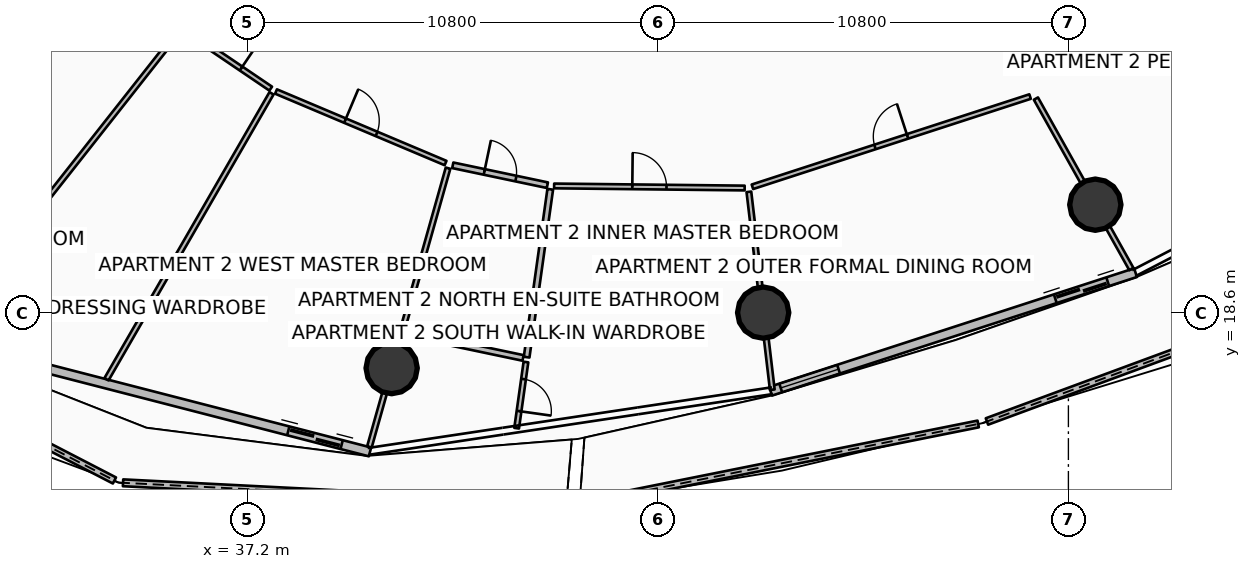
"""IFC4 building model, lengths in metres.
Left out: names, types, materials, properties, quantities, classifications, styles, units other than length and angle.
Written with IfcOpenShell. Run it as: python <this file> out.ifc"""

import sys

from ifc_helpers import new_model, si_unit, direction, frame, frame_2d, origin, origin_2d, place, context, subcontext, project, spatial, polyline, rectangle, circle, outline, extrude, element, fill, save


model = new_model("IFC4")
c1 = context("Model", 3, precision=1e-05, world=origin(), true_north=direction((0.0, 1.0)))
c2 = subcontext(c1, "Body", "Model", "MODEL_VIEW")
j1 = project(units=[si_unit("LENGTHUNIT", "METRE"), si_unit("PLANEANGLEUNIT", "RADIAN")], contexts=[c1])
p1 = place(None, origin())
s1 = spatial("IfcSite", under=j1, at=p1, CompositionType="ELEMENT")
p2 = place(p1, origin())
s2 = spatial("IfcBuilding", under=s1, at=p2, CompositionType="ELEMENT")
p3 = place(p2, frame((0.0, 0.0, 37.65)))
s3 = spatial("IfcBuildingStorey", under=s2, at=p3, CompositionType="ELEMENT", Elevation=37.65)
for number, where, z_axis, x_axis in (
    (1, (40.992, 17.151, 0.0), (0.0, 0.0, 1.0), (1.0, 0.0, 0.0)),
    (2, (50.768, 18.611, 0.0), (0.0, 0.0, 1.0), (1.0, 0.0, 0.0)),
    (3, (59.508, 21.45, 0.0), (0.0, 0.0, 1.0), (1.0, 0.0, 0.0)),
):
    element("IfcColumn", number, at=place(p3, frame(where, z_axis=z_axis, x_axis=x_axis)), inside=s3, PredefinedType="COLUMN", context=c2, shape_type="SweptSolid", body=[
        extrude(circle(Radius=0.675, at=origin_2d()), origin(), (0.0, 0.0, 1.0), 3.5),
    ])
p4 = place(p3, frame((22.527, 19.973, 0.0), z_axis=(0.0, 0.0, 1.0), x_axis=(0.888165194013, -0.459524306368, 0.0)))
e4 = element("IfcWall", 4, at=p4, inside=s3, PredefinedType="PARAPET", context=c2, shape_type="SweptSolid", body=[
    extrude(outline(polyline([(0.0, 0.0), (12.577, 0.0), (12.577, 1.148), (6.289, 1.284), (0.0, 1.483), (0.0, 0.0)])), frame((0.0, 0.09, 0.0), z_axis=(0.0, -1.0, 0.0), x_axis=(1.0, 0.0, 0.0)), (0.0, 0.0, 1.0), 0.18),
])
p5 = place(p3, frame((33.924, 14.133, 0.0), z_axis=(0.0, 0.0, 1.0), x_axis=(0.998712715241, -0.050723884084, 0.0)))
e5 = element("IfcWall", 5, at=p5, inside=s3, PredefinedType="PARAPET", context=c2, shape_type="SweptSolid", body=[
    extrude(outline(polyline([(0.0, 0.0), (11.677, 0.0), (11.677, 1.224), (5.838, 1.127), (0.0, 1.148), (0.0, 0.0)])), frame((0.0, 0.09, 0.0), z_axis=(0.0, -1.0, 0.0), x_axis=(1.0, 0.0, 0.0)), (0.0, 0.0, 1.0), 0.18),
])
p6 = place(p3, frame((45.938, 13.58, 0.0), z_axis=(0.0, 0.0, 1.0), x_axis=(0.980527969077, 0.19637948431, 0.0)))
e6 = element("IfcWall", 6, at=p6, inside=s3, PredefinedType="PARAPET", context=c2, shape_type="SweptSolid", body=[
    extrude(outline(polyline([(0.0, 0.0), (10.697, 0.0), (10.697, 1.632), (5.348, 1.418), (0.0, 1.233), (0.0, 0.0)])), frame((0.0, 0.09, 0.0), z_axis=(0.0, -1.0, 0.0), x_axis=(1.0, 0.0, 0.0)), (0.0, 0.0, 1.0), 0.18),
])
p7 = place(p3, frame((56.656, 15.746, 0.0), z_axis=(0.0, 0.0, 1.0), x_axis=(0.938003942123, 0.346624587358, 0.0)))
e7 = element("IfcWall", 7, at=p7, inside=s3, PredefinedType="PARAPET", context=c2, shape_type="SweptSolid", body=[
    extrude(outline(polyline([(0.0, 0.0), (10.964, 0.0), (10.964, 1.86), (5.482, 1.798), (0.0, 1.632), (0.0, 0.0)])), frame((0.0, 0.09, 0.0), z_axis=(0.0, -1.0, 0.0), x_axis=(1.0, 0.0, 0.0)), (0.0, 0.0, 1.0), 0.18),
])
p8 = place(p3, frame((28.946, 17.904, 0.0), z_axis=(0.0, 0.0, 1.0), x_axis=(0.96833871487, -0.249640007378, 0.0)))
e8 = element("IfcWall", 8, at=p8, inside=s3, PredefinedType="SOLIDWALL", context=c2, shape_type="SweptSolid", body=[
    extrude(rectangle(XDim=11.851, YDim=0.24, at=frame_2d((5.926, 0.0))), origin(), (0.0, 0.0, 1.0), 2.45),
])
p9 = place(p8, frame((9.631, 0.0, 0.0)))
e9 = element("IfcOpeningElement", 9, at=p9, cuts=e8, PredefinedType="OPENING", context=c2, shape_type="SweptSolid", body=[
    extrude(rectangle(XDim=1.45, YDim=2.15, at=frame_2d((0.725, 1.075))), frame((0.0, 0.13, 0.0), z_axis=(0.0, -1.0, 0.0), x_axis=(1.0, 0.0, 0.0)), (0.0, 0.0, 1.0), 0.26),
])
p10 = place(p8, frame((0.28, 0.0, 0.65)))
e10 = element("IfcOpeningElement", 10, at=p10, cuts=e8, PredefinedType="OPENING", context=c2, shape_type="SweptSolid", body=[
    extrude(rectangle(XDim=1.6, YDim=1.5, at=frame_2d((0.8, 0.75))), frame((0.0, 0.13, 0.0), z_axis=(0.0, -1.0, 0.0), x_axis=(1.0, 0.0, 0.0)), (0.0, 0.0, 1.0), 0.26),
])
p11 = place(p3, frame((50.964, 16.542, 0.0), z_axis=(0.0, 0.0, 1.0), x_axis=(0.951054679225, 0.309022648238, 0.0)))
e11 = element("IfcWall", 11, at=p11, inside=s3, PredefinedType="SOLIDWALL", context=c2, shape_type="SweptSolid", body=[
    extrude(rectangle(XDim=10.097, YDim=0.24, at=frame_2d((5.048, 0.0))), origin(), (0.0, 0.0, 1.0), 2.45),
])
p12 = place(p11, frame((7.877, 0.0, 0.0)))
e12 = element("IfcOpeningElement", 12, at=p12, cuts=e11, PredefinedType="OPENING", context=c2, shape_type="SweptSolid", body=[
    extrude(rectangle(XDim=1.45, YDim=2.15, at=frame_2d((0.725, 1.075))), frame((0.0, 0.13, 0.0), z_axis=(0.0, -1.0, 0.0), x_axis=(1.0, 0.0, 0.0)), (0.0, 0.0, 1.0), 0.26),
])
p13 = place(p11, frame((0.28, 0.0, 0.65)))
e13 = element("IfcOpeningElement", 13, at=p13, cuts=e11, PredefinedType="OPENING", context=c2, shape_type="SweptSolid", body=[
    extrude(rectangle(XDim=1.6, YDim=1.5, at=frame_2d((0.8, 0.75))), frame((0.0, 0.13, 0.0), z_axis=(0.0, -1.0, 0.0), x_axis=(1.0, 0.0, 0.0)), (0.0, 0.0, 1.0), 0.26),
])
p14 = place(p3, frame((33.291, 27.947, 0.0), z_axis=(0.0, 0.0, 1.0), x_axis=(-0.72304195697, -0.690804117287, 0.0)))
e14 = element("IfcWall", 14, at=p14, inside=s3, PredefinedType="PARTITIONING", context=c2, shape_type="SweptSolid", body=[
    extrude(rectangle(XDim=10.36, YDim=0.125, at=frame_2d((5.18, 0.0))), origin(), (0.0, 0.0, 1.0), 2.94),
])
p15 = place(p3, frame((35.4, 26.017, 0.0), z_axis=(0.0, 0.0, 1.0), x_axis=(-0.619085809847, -0.785323347447, 0.0)))
e15 = element("IfcWall", 15, at=p15, inside=s3, PredefinedType="PARTITIONING", context=c2, shape_type="SweptSolid", body=[
    extrude(rectangle(XDim=10.322, YDim=0.125, at=frame_2d((5.161, 0.0))), origin(), (0.0, 0.0, 1.0), 2.867),
])
p16 = place(p3, frame((37.831, 24.381, 0.0), z_axis=(0.0, 0.0, 1.0), x_axis=(-0.499878153527, -0.866095740451, 0.0)))
e16 = element("IfcWall", 16, at=p16, inside=s3, PredefinedType="PARTITIONING", context=c2, shape_type="SweptSolid", body=[
    extrude(rectangle(XDim=8.687, YDim=0.125, at=frame_2d((4.344, 0.0))), origin(), (0.0, 0.0, 1.0), 2.94),
])
p17 = place(p3, frame((35.544, 26.039, 0.0), z_axis=(0.0, 0.0, 1.0), x_axis=(0.827867904516, -0.560923107629, 0.0)))
e17 = element("IfcWall", 17, at=p17, inside=s3, PredefinedType="PARTITIONING", context=c2, shape_type="SweptSolid", body=[
    extrude(rectangle(XDim=2.736, YDim=0.125, at=frame_2d((1.368, 0.0))), origin(), (0.0, 0.0, 1.0), 2.867),
])
p18 = place(p17, frame((0.943, 0.0, 0.0)))
e18 = element("IfcOpeningElement", 18, at=p18, cuts=e17, PredefinedType="OPENING", context=c2, shape_type="SweptSolid", body=[
    extrude(rectangle(XDim=0.85, YDim=2.06, at=frame_2d((0.425, 1.03))), frame((0.0, 0.073, 0.0), z_axis=(0.0, -1.0, 0.0), x_axis=(1.0, 0.0, 0.0)), (0.0, 0.0, 1.0), 0.145),
])
p19 = place(p3, frame((37.949, 24.428, 0.0), z_axis=(0.0, 0.0, 1.0), x_axis=(0.921391247889, -0.388636293098, 0.0)))
e19 = element("IfcWall", 19, at=p19, inside=s3, PredefinedType="PARTITIONING", context=c2, shape_type="SweptSolid", body=[
    extrude(rectangle(XDim=4.842, YDim=0.125, at=frame_2d((2.421, 0.0))), origin(), (0.0, 0.0, 1.0), 2.867),
])
p20 = place(p19, frame((1.971, 0.0, 0.0)))
e20 = element("IfcOpeningElement", 20, at=p20, cuts=e19, PredefinedType="OPENING", context=c2, shape_type="SweptSolid", body=[
    extrude(rectangle(XDim=0.9, YDim=2.08, at=frame_2d((0.45, 1.04))), frame((0.0, 0.073, 0.0), z_axis=(0.0, -1.0, 0.0), x_axis=(1.0, 0.0, 0.0)), (0.0, 0.0, 1.0), 0.145),
])
p21 = place(p3, frame((42.475, 22.411, 0.0), z_axis=(0.0, 0.0, 1.0), x_axis=(-0.271439615814, -0.96245547168, 0.0)))
e21 = element("IfcWall", 21, at=p21, inside=s3, PredefinedType="PARTITIONING", context=c2, shape_type="SweptSolid", body=[
    extrude(rectangle(XDim=7.619, YDim=0.125, at=frame_2d((3.81, 0.0))), origin(), (0.0, 0.0, 1.0), 2.867),
])
p22 = place(p3, frame((42.6, 22.487, 0.0), z_axis=(0.0, 0.0, 1.0), x_axis=(0.978579306251, -0.20587020517, 0.0)))
e22 = element("IfcWall", 22, at=p22, inside=s3, PredefinedType="PARTITIONING", context=c2, shape_type="SweptSolid", body=[
    extrude(rectangle(XDim=2.544, YDim=0.15, at=frame_2d((1.272, 0.0))), origin(), (0.0, 0.0, 1.0), 2.867),
])
p23 = place(p22, frame((0.847, 0.0, 0.0)))
e23 = element("IfcOpeningElement", 23, at=p23, cuts=e22, PredefinedType="OPENING", context=c2, shape_type="SweptSolid", body=[
    extrude(rectangle(XDim=0.85, YDim=2.06, at=frame_2d((0.425, 1.03))), frame((0.0, 0.085, 0.0), z_axis=(0.0, -1.0, 0.0), x_axis=(1.0, 0.0, 0.0)), (0.0, 0.0, 1.0), 0.17),
])
p24 = place(p3, frame((41.354, 18.069, 0.0), z_axis=(0.0, 0.0, 1.0), x_axis=(0.978588253421, -0.205827671283, 0.0)))
e24 = element("IfcWall", 24, at=p24, inside=s3, PredefinedType="PARTITIONING", context=c2, shape_type="SweptSolid", body=[
    extrude(rectangle(XDim=3.163, YDim=0.15, at=frame_2d((1.582, 0.0))), origin(), (0.0, 0.0, 1.0), 2.867),
])
p25 = place(p3, frame((45.165, 21.855, 0.0), z_axis=(0.0, 0.0, 1.0), x_axis=(-0.139367219172, -0.990240767804, 0.0)))
e25 = element("IfcWall", 25, at=p25, inside=s3, PredefinedType="PARTITIONING", context=c2, shape_type="SweptSolid", body=[
    extrude(rectangle(XDim=4.46, YDim=0.15, at=frame_2d((2.23, 0.0))), origin(), (0.0, 0.0, 1.0), 2.94),
])
p26 = place(p3, frame((44.526, 17.31, 0.0), z_axis=(0.0, 0.0, 1.0), x_axis=(-0.139282491489, -0.990252688744, 0.0)))
e26 = element("IfcWall", 26, at=p26, inside=s3, PredefinedType="PARTITIONING", context=c2, shape_type="SweptSolid", body=[
    extrude(rectangle(XDim=1.758, YDim=0.125, at=frame_2d((0.879, 0.0))), origin(), (0.0, 0.0, 1.0), 2.94),
])
p27 = place(p26, frame((0.454, 0.0, 0.0)))
e27 = element("IfcOpeningElement", 27, at=p27, cuts=e26, PredefinedType="OPENING", context=c2, shape_type="SweptSolid", body=[
    extrude(rectangle(XDim=0.85, YDim=2.06, at=frame_2d((0.425, 1.03))), frame((0.0, 0.073, 0.0), z_axis=(0.0, -1.0, 0.0), x_axis=(1.0, 0.0, 0.0)), (0.0, 0.0, 1.0), 0.145),
])
p28 = place(p3, frame((45.268, 21.944, 0.0), z_axis=(0.0, 0.0, 1.0), x_axis=(0.999939426187, -0.011006541512, 0.0)))
e28 = element("IfcWall", 28, at=p28, inside=s3, PredefinedType="PARTITIONING", context=c2, shape_type="SweptSolid", body=[
    extrude(rectangle(XDim=5.013, YDim=0.125, at=frame_2d((2.506, 0.0))), origin(), (0.0, 0.0, 1.0), 2.94),
])
p29 = place(p28, frame((2.056, 0.0, 0.0)))
e29 = element("IfcOpeningElement", 29, at=p29, cuts=e28, PredefinedType="OPENING", context=c2, shape_type="SweptSolid", body=[
    extrude(rectangle(XDim=0.9, YDim=2.08, at=frame_2d((0.45, 1.04))), frame((0.0, 0.073, 0.0), z_axis=(0.0, -1.0, 0.0), x_axis=(1.0, 0.0, 0.0)), (0.0, 0.0, 1.0), 0.145),
])
p30 = place(p3, frame((50.392, 21.788, 0.0), z_axis=(0.0, 0.0, 1.0), x_axis=(0.11749238711, -0.993073783246, 0.0)))
e30 = element("IfcWall", 30, at=p30, inside=s3, PredefinedType="PARTITIONING", context=c2, shape_type="SweptSolid", body=[
    extrude(rectangle(XDim=5.243, YDim=0.125, at=frame_2d((2.621, 0.0))), origin(), (0.0, 0.0, 1.0), 2.867),
])
p31 = place(p3, frame((57.945, 24.242, 0.0), z_axis=(0.0, 0.0, 1.0), x_axis=(0.488630834306, -0.872490634772, 0.0)))
e31 = element("IfcWall", 31, at=p31, inside=s3, PredefinedType="PARTITIONING", context=c2, shape_type="SweptSolid", body=[
    extrude(rectangle(XDim=5.143, YDim=0.125, at=frame_2d((2.571, 0.0))), origin(), (0.0, 0.0, 1.0), 2.867),
])
p32 = place(p3, frame((50.485, 21.921, 0.0), z_axis=(0.0, 0.0, 1.0), x_axis=(0.951055318468, 0.309020680883, 0.0)))
e32 = element("IfcWall", 32, at=p32, inside=s3, PredefinedType="PARTITIONING", context=c2, shape_type="SweptSolid", body=[
    extrude(rectangle(XDim=7.682, YDim=0.125, at=frame_2d((3.841, 0.0))), origin(), (0.0, 0.0, 1.0), 2.867),
])
p33 = place(p32, frame((3.391, 0.0, 0.0)))
e33 = element("IfcOpeningElement", 33, at=p33, cuts=e32, PredefinedType="OPENING", context=c2, shape_type="SweptSolid", body=[
    extrude(rectangle(XDim=0.9, YDim=2.08, at=frame_2d((0.45, 1.04))), frame((0.0, 0.073, 0.0), z_axis=(0.0, -1.0, 0.0), x_axis=(1.0, 0.0, 0.0)), (0.0, 0.0, 1.0), 0.145),
])
p34 = place(p9, origin())
e34 = element("IfcDoor", 34, at=p34, inside=s3, OperationType="DOUBLE_DOOR_SLIDING", PredefinedType="DOOR", context=c2, shape_type="SweptSolid", body=[
    extrude(rectangle(XDim=1.45, YDim=2.15, at=frame_2d((0.725, 1.075))), frame((0.0, 0.025, 0.0), z_axis=(0.0, -1.0, 0.0), x_axis=(1.0, 0.0, 0.0)), (0.0, 0.0, 1.0), 0.05),
])
fill(e9, e34)
p35 = place(p12, origin())
e35 = element("IfcDoor", 35, at=p35, inside=s3, OperationType="DOUBLE_DOOR_SLIDING", PredefinedType="DOOR", context=c2, shape_type="SweptSolid", body=[
    extrude(rectangle(XDim=1.45, YDim=2.15, at=frame_2d((0.725, 1.075))), frame((0.0, 0.025, 0.0), z_axis=(0.0, -1.0, 0.0), x_axis=(1.0, 0.0, 0.0)), (0.0, 0.0, 1.0), 0.05),
])
fill(e12, e35)
p36 = place(p13, origin())
e36 = element("IfcWindow", 36, at=p36, inside=s3, PartitioningType="SINGLE_PANEL", PredefinedType="WINDOW", context=c2, shape_type="SweptSolid", body=[
    extrude(rectangle(XDim=1.6, YDim=1.5, at=frame_2d((0.8, 0.75))), frame((0.0, 0.03, 0.0), z_axis=(0.0, -1.0, 0.0), x_axis=(1.0, 0.0, 0.0)), (0.0, 0.0, 1.0), 0.06),
])
fill(e13, e36)
p37 = place(p18, origin())
e37 = element("IfcDoor", 37, at=p37, inside=s3, OperationType="SINGLE_SWING_RIGHT", PredefinedType="DOOR", context=c2, shape_type="SweptSolid", body=[
    extrude(rectangle(XDim=0.85, YDim=2.06, at=frame_2d((0.425, 1.03))), frame((0.0, 0.025, 0.0), z_axis=(0.0, -1.0, 0.0), x_axis=(1.0, 0.0, 0.0)), (0.0, 0.0, 1.0), 0.05),
])
fill(e18, e37)
p38 = place(p20, origin())
e38 = element("IfcDoor", 38, at=p38, inside=s3, OperationType="SINGLE_SWING_LEFT", PredefinedType="DOOR", context=c2, shape_type="SweptSolid", body=[
    extrude(rectangle(XDim=0.9, YDim=2.08, at=frame_2d((0.45, 1.04))), frame((0.0, 0.025, 0.0), z_axis=(0.0, -1.0, 0.0), x_axis=(1.0, 0.0, 0.0)), (0.0, 0.0, 1.0), 0.05),
])
fill(e20, e38)
p39 = place(p23, origin())
e39 = element("IfcDoor", 39, at=p39, inside=s3, OperationType="SINGLE_SWING_LEFT", PredefinedType="DOOR", context=c2, shape_type="SweptSolid", body=[
    extrude(rectangle(XDim=0.85, YDim=2.06, at=frame_2d((0.425, 1.03))), frame((0.0, 0.025, 0.0), z_axis=(0.0, -1.0, 0.0), x_axis=(1.0, 0.0, 0.0)), (0.0, 0.0, 1.0), 0.05),
])
fill(e23, e39)
p40 = place(p27, origin())
e40 = element("IfcDoor", 40, at=p40, inside=s3, OperationType="SINGLE_SWING_RIGHT", PredefinedType="DOOR", context=c2, shape_type="SweptSolid", body=[
    extrude(rectangle(XDim=0.85, YDim=2.06, at=frame_2d((0.425, 1.03))), frame((0.0, 0.025, 0.0), z_axis=(0.0, -1.0, 0.0), x_axis=(1.0, 0.0, 0.0)), (0.0, 0.0, 1.0), 0.05),
])
fill(e27, e40)
p41 = place(p29, origin())
e41 = element("IfcDoor", 41, at=p41, inside=s3, OperationType="SINGLE_SWING_LEFT", PredefinedType="DOOR", context=c2, shape_type="SweptSolid", body=[
    extrude(rectangle(XDim=0.9, YDim=2.08, at=frame_2d((0.45, 1.04))), frame((0.0, 0.025, 0.0), z_axis=(0.0, -1.0, 0.0), x_axis=(1.0, 0.0, 0.0)), (0.0, 0.0, 1.0), 0.05),
])
fill(e29, e41)
p42 = place(p33, origin())
e42 = element("IfcDoor", 42, at=p42, inside=s3, OperationType="SINGLE_SWING_RIGHT", PredefinedType="DOOR", context=c2, shape_type="SweptSolid", body=[
    extrude(rectangle(XDim=0.9, YDim=2.08, at=frame_2d((0.45, 1.04))), frame((0.0, 0.025, 0.0), z_axis=(0.0, -1.0, 0.0), x_axis=(1.0, 0.0, 0.0)), (0.0, 0.0, 1.0), 0.05),
])
fill(e33, e42)
save(model, sys.argv[1])
